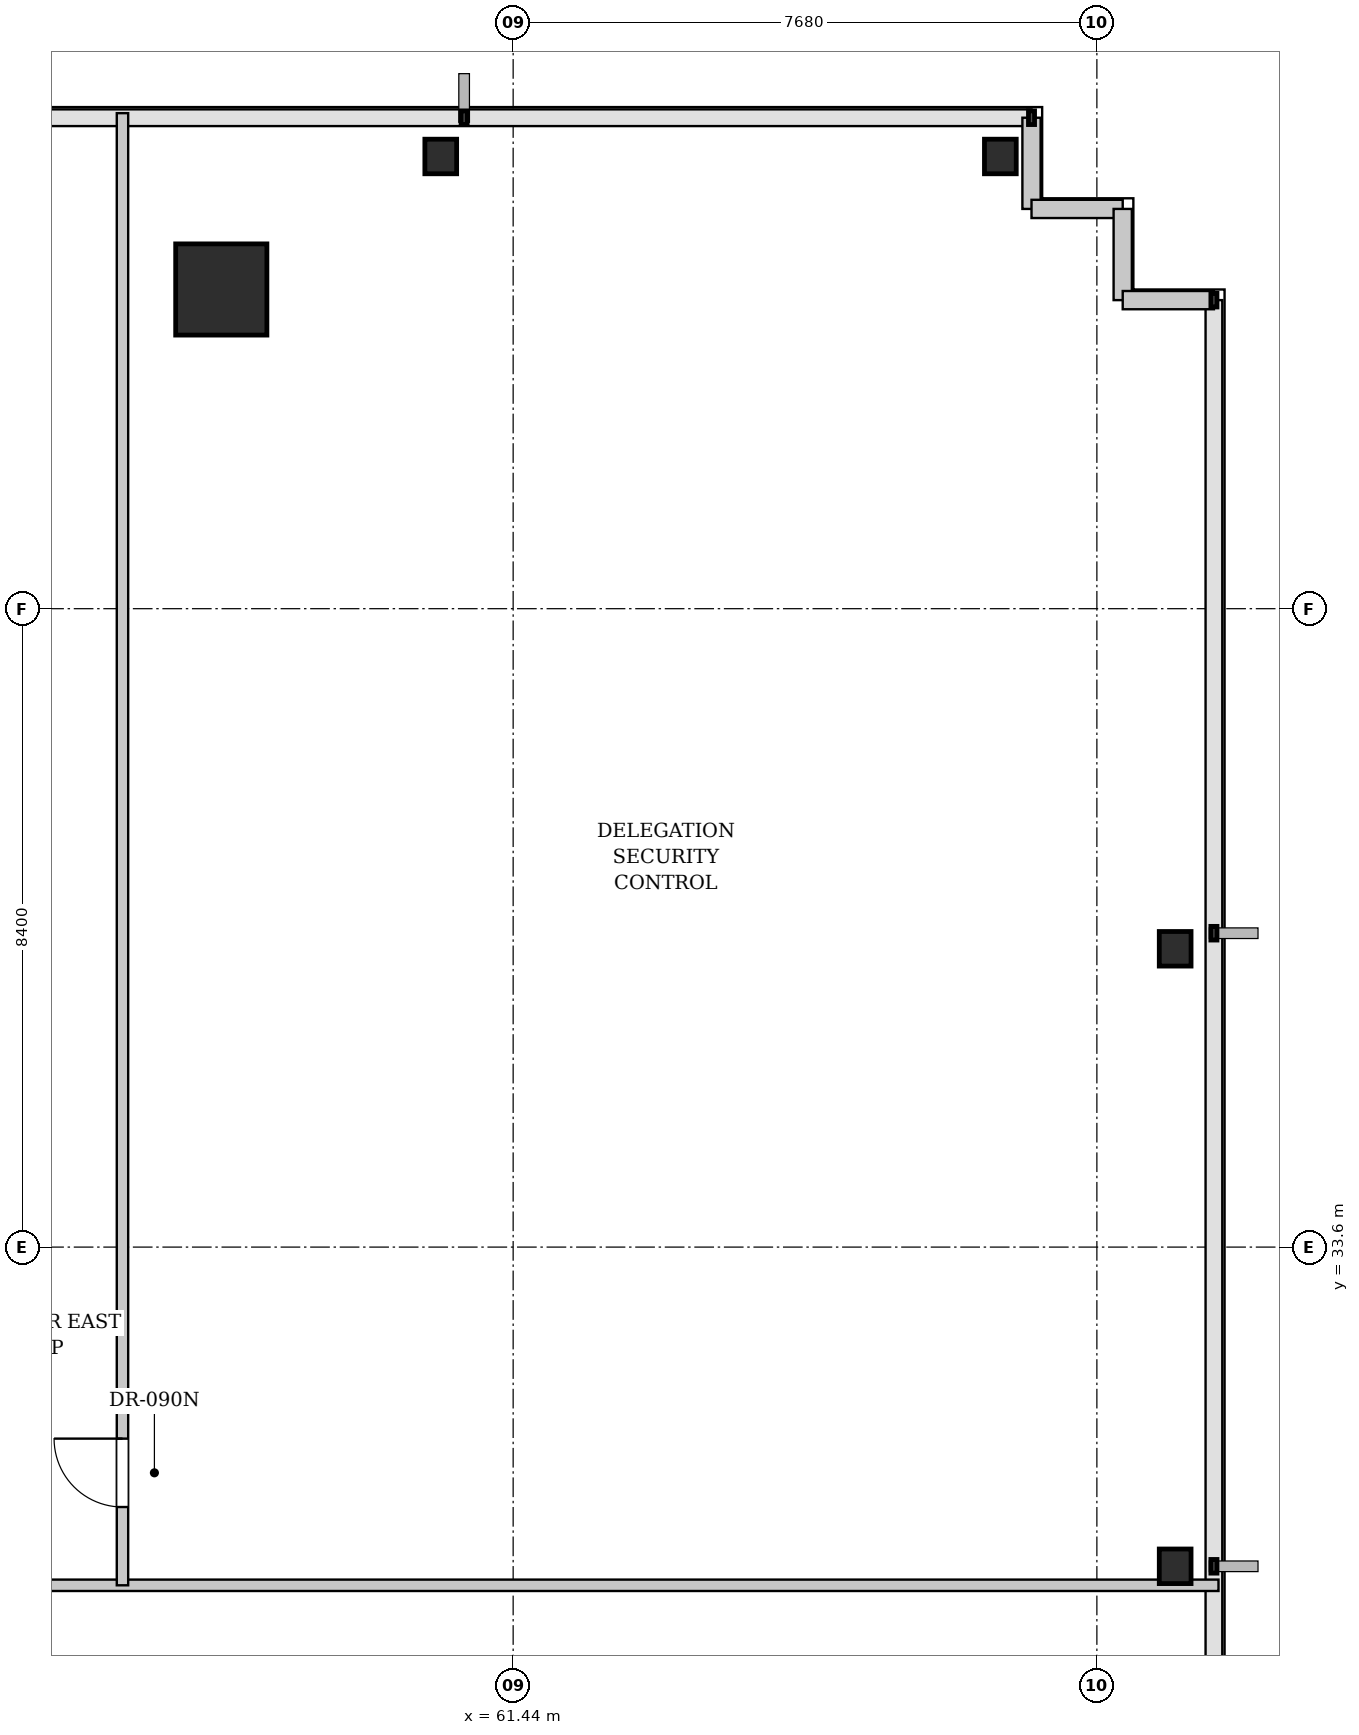
"""IFC4 building model, lengths in metres.
Left out: names, types, materials, properties, quantities, classifications, styles, units other than length and angle.
Written with IfcOpenShell. Run it as: python <this file> out.ifc"""

import sys

from ifc_helpers import new_model, si_unit, direction, frame, frame_2d, origin, origin_2d, place, context, subcontext, project, spatial, rectangle, i_section, extrude, element, fill, save


model = new_model("IFC4")
c1 = context("Model", 3, precision=1e-05, world=origin(), true_north=direction((0.0, 1.0)))
c2 = subcontext(c1, "Body", "Model", "MODEL_VIEW")
j1 = project(units=[si_unit("LENGTHUNIT", "METRE"), si_unit("PLANEANGLEUNIT", "RADIAN")], contexts=[c1])
p1 = place(None, origin())
s1 = spatial("IfcSite", under=j1, at=p1, CompositionType="ELEMENT")
p2 = place(p1, origin())
s2 = spatial("IfcBuilding", under=s1, at=p2, CompositionType="ELEMENT")
p3 = place(p2, frame((0.0, 0.0, 64.4)))
s3 = spatial("IfcBuildingStorey", under=s2, at=p3, CompositionType="ELEMENT", Elevation=64.4)
p4 = place(p3, frame((57.6, 46.2, 0.0), z_axis=(0.0, 0.0, 1.0), x_axis=(1.0, 0.0, 0.0)))
e1 = element("IfcColumn", 1, at=p4, inside=s3, PredefinedType="COLUMN", context=c2, shape_type="SweptSolid", body=[
    extrude(rectangle(XDim=1.2, YDim=1.2, at=origin_2d()), origin(), (0.0, 0.0, 1.0), 3.4),
])
for number, where, z_axis, x_axis in (
    (2, (60.488, 47.95, 0.0), (0.0, 0.0, 1.0), (1.0, 0.0, 0.0)),
    (3, (67.85, 47.95, 0.0), (0.0, 0.0, 1.0), (1.0, 0.0, 0.0)),
    (4, (70.15, 29.4, 0.0), (0.0, 0.0, 1.0), (1.0, 0.0, 0.0)),
    (5, (70.15, 37.525, 0.0), (0.0, 0.0, 1.0), (1.0, 0.0, 0.0)),
):
    element("IfcColumn", number, at=place(p3, frame(where, z_axis=z_axis, x_axis=x_axis)), inside=s3, PredefinedType="COLUMN", context=c2, shape_type="SweptSolid", body=[
        extrude(i_section(OverallWidth=0.418, OverallDepth=0.455, WebThickness=0.042, FlangeThickness=0.068, FilletRadius=0.015, at=origin_2d()), origin(), (0.0, 0.0, 1.0), 3.4),
    ])
for number, where, z_axis, x_axis in (
    (6, (68.26, 48.46, 0.0), (0.0, 0.0, 1.0), (0.0, -1.0, 0.0)),
    (7, (68.26, 47.26, 0.0), (0.0, 0.0, 1.0), (1.0, 0.0, 0.0)),
    (8, (69.46, 47.26, 0.0), (0.0, 0.0, 1.0), (0.0, -1.0, 0.0)),
    (9, (69.46, 46.06, 0.0), (0.0, 0.0, 1.0), (1.0, 0.0, 0.0)),
):
    element("IfcWall", number, at=place(p3, frame(where, z_axis=z_axis, x_axis=x_axis)), inside=s3, PredefinedType="SOLIDWALL", context=c2, shape_type="SweptSolid", body=[
        extrude(rectangle(XDim=1.2, YDim=0.24, at=frame_2d((0.6, 0.0))), origin(), (0.0, 0.0, 1.0), 3.18),
    ])
p5 = place(p3, frame((6.08, 29.15, 0.0), z_axis=(0.0, 0.0, 1.0), x_axis=(1.0, 0.0, 0.0)))
e10 = element("IfcWall", 10, at=p5, inside=s3, PredefinedType="PARTITIONING", context=c2, shape_type="SweptSolid", body=[
    extrude(rectangle(XDim=64.64, YDim=0.15, at=frame_2d((32.32, 0.0))), origin(), (0.0, 0.0, 1.0), 3.18),
])
p6 = place(p5, frame((18.741, 0.0, 0.0)))
e11 = element("IfcOpeningElement", 11, at=p6, cuts=e10, PredefinedType="OPENING", context=c2, shape_type="SweptSolid", body=[
    extrude(rectangle(XDim=1.0, YDim=2.15, at=frame_2d((0.5, 1.075))), frame((0.0, 0.085, 0.0), z_axis=(0.0, -1.0, 0.0), x_axis=(1.0, 0.0, 0.0)), (0.0, 0.0, 1.0), 0.17),
])
p7 = place(p5, frame((29.245, 0.0, 0.0)))
e12 = element("IfcOpeningElement", 12, at=p7, cuts=e10, PredefinedType="OPENING", context=c2, shape_type="SweptSolid", body=[
    extrude(rectangle(XDim=1.0, YDim=2.15, at=frame_2d((0.5, 1.075))), frame((0.0, 0.085, 0.0), z_axis=(0.0, -1.0, 0.0), x_axis=(1.0, 0.0, 0.0)), (0.0, 0.0, 1.0), 0.17),
])
p8 = place(p5, frame((38.64, 0.0, 0.0)))
e13 = element("IfcOpeningElement", 13, at=p8, cuts=e10, PredefinedType="OPENING", context=c2, shape_type="SweptSolid", body=[
    extrude(rectangle(XDim=1.0, YDim=2.15, at=frame_2d((0.5, 1.075))), frame((0.0, 0.085, 0.0), z_axis=(0.0, -1.0, 0.0), x_axis=(1.0, 0.0, 0.0)), (0.0, 0.0, 1.0), 0.17),
])
p9 = place(p5, frame((46.011, 0.0, 0.0)))
e14 = element("IfcOpeningElement", 14, at=p9, cuts=e10, PredefinedType="OPENING", context=c2, shape_type="SweptSolid", body=[
    extrude(rectangle(XDim=1.0, YDim=2.15, at=frame_2d((0.5, 1.075))), frame((0.0, 0.085, 0.0), z_axis=(0.0, -1.0, 0.0), x_axis=(1.0, 0.0, 0.0)), (0.0, 0.0, 1.0), 0.17),
])
p10 = place(p3, frame((56.3, 29.15, 0.0), z_axis=(0.0, 0.0, 1.0), x_axis=(0.0, 1.0, 0.0)))
e15 = element("IfcWall", 15, at=p10, inside=s3, PredefinedType="PARTITIONING", context=c2, shape_type="SweptSolid", body=[
    extrude(rectangle(XDim=19.37, YDim=0.15, at=frame_2d((9.685, 0.0))), origin(), (0.0, 0.0, 1.0), 3.18),
])
p11 = place(p10, frame((1.03, 0.0, 0.0)))
e16 = element("IfcOpeningElement", 16, at=p11, cuts=e15, PredefinedType="OPENING", context=c2, shape_type="SweptSolid", body=[
    extrude(rectangle(XDim=0.9, YDim=2.15, at=frame_2d((0.45, 1.075))), frame((0.0, 0.085, 0.0), z_axis=(0.0, -1.0, 0.0), x_axis=(1.0, 0.0, 0.0)), (0.0, 0.0, 1.0), 0.17),
])
p12 = place(p11, origin())
e17 = element("IfcDoor", 17, at=p12, inside=s3, OperationType="SINGLE_SWING_RIGHT", PredefinedType="DOOR", context=c2, shape_type="SweptSolid", body=[
    extrude(rectangle(XDim=0.9, YDim=2.15, at=frame_2d((0.45, 1.075))), frame((0.0, 0.025, 0.0), z_axis=(0.0, -1.0, 0.0), x_axis=(1.0, 0.0, 0.0)), (0.0, 0.0, 1.0), 0.05),
])
fill(e16, e17)
save(model, sys.argv[1])
